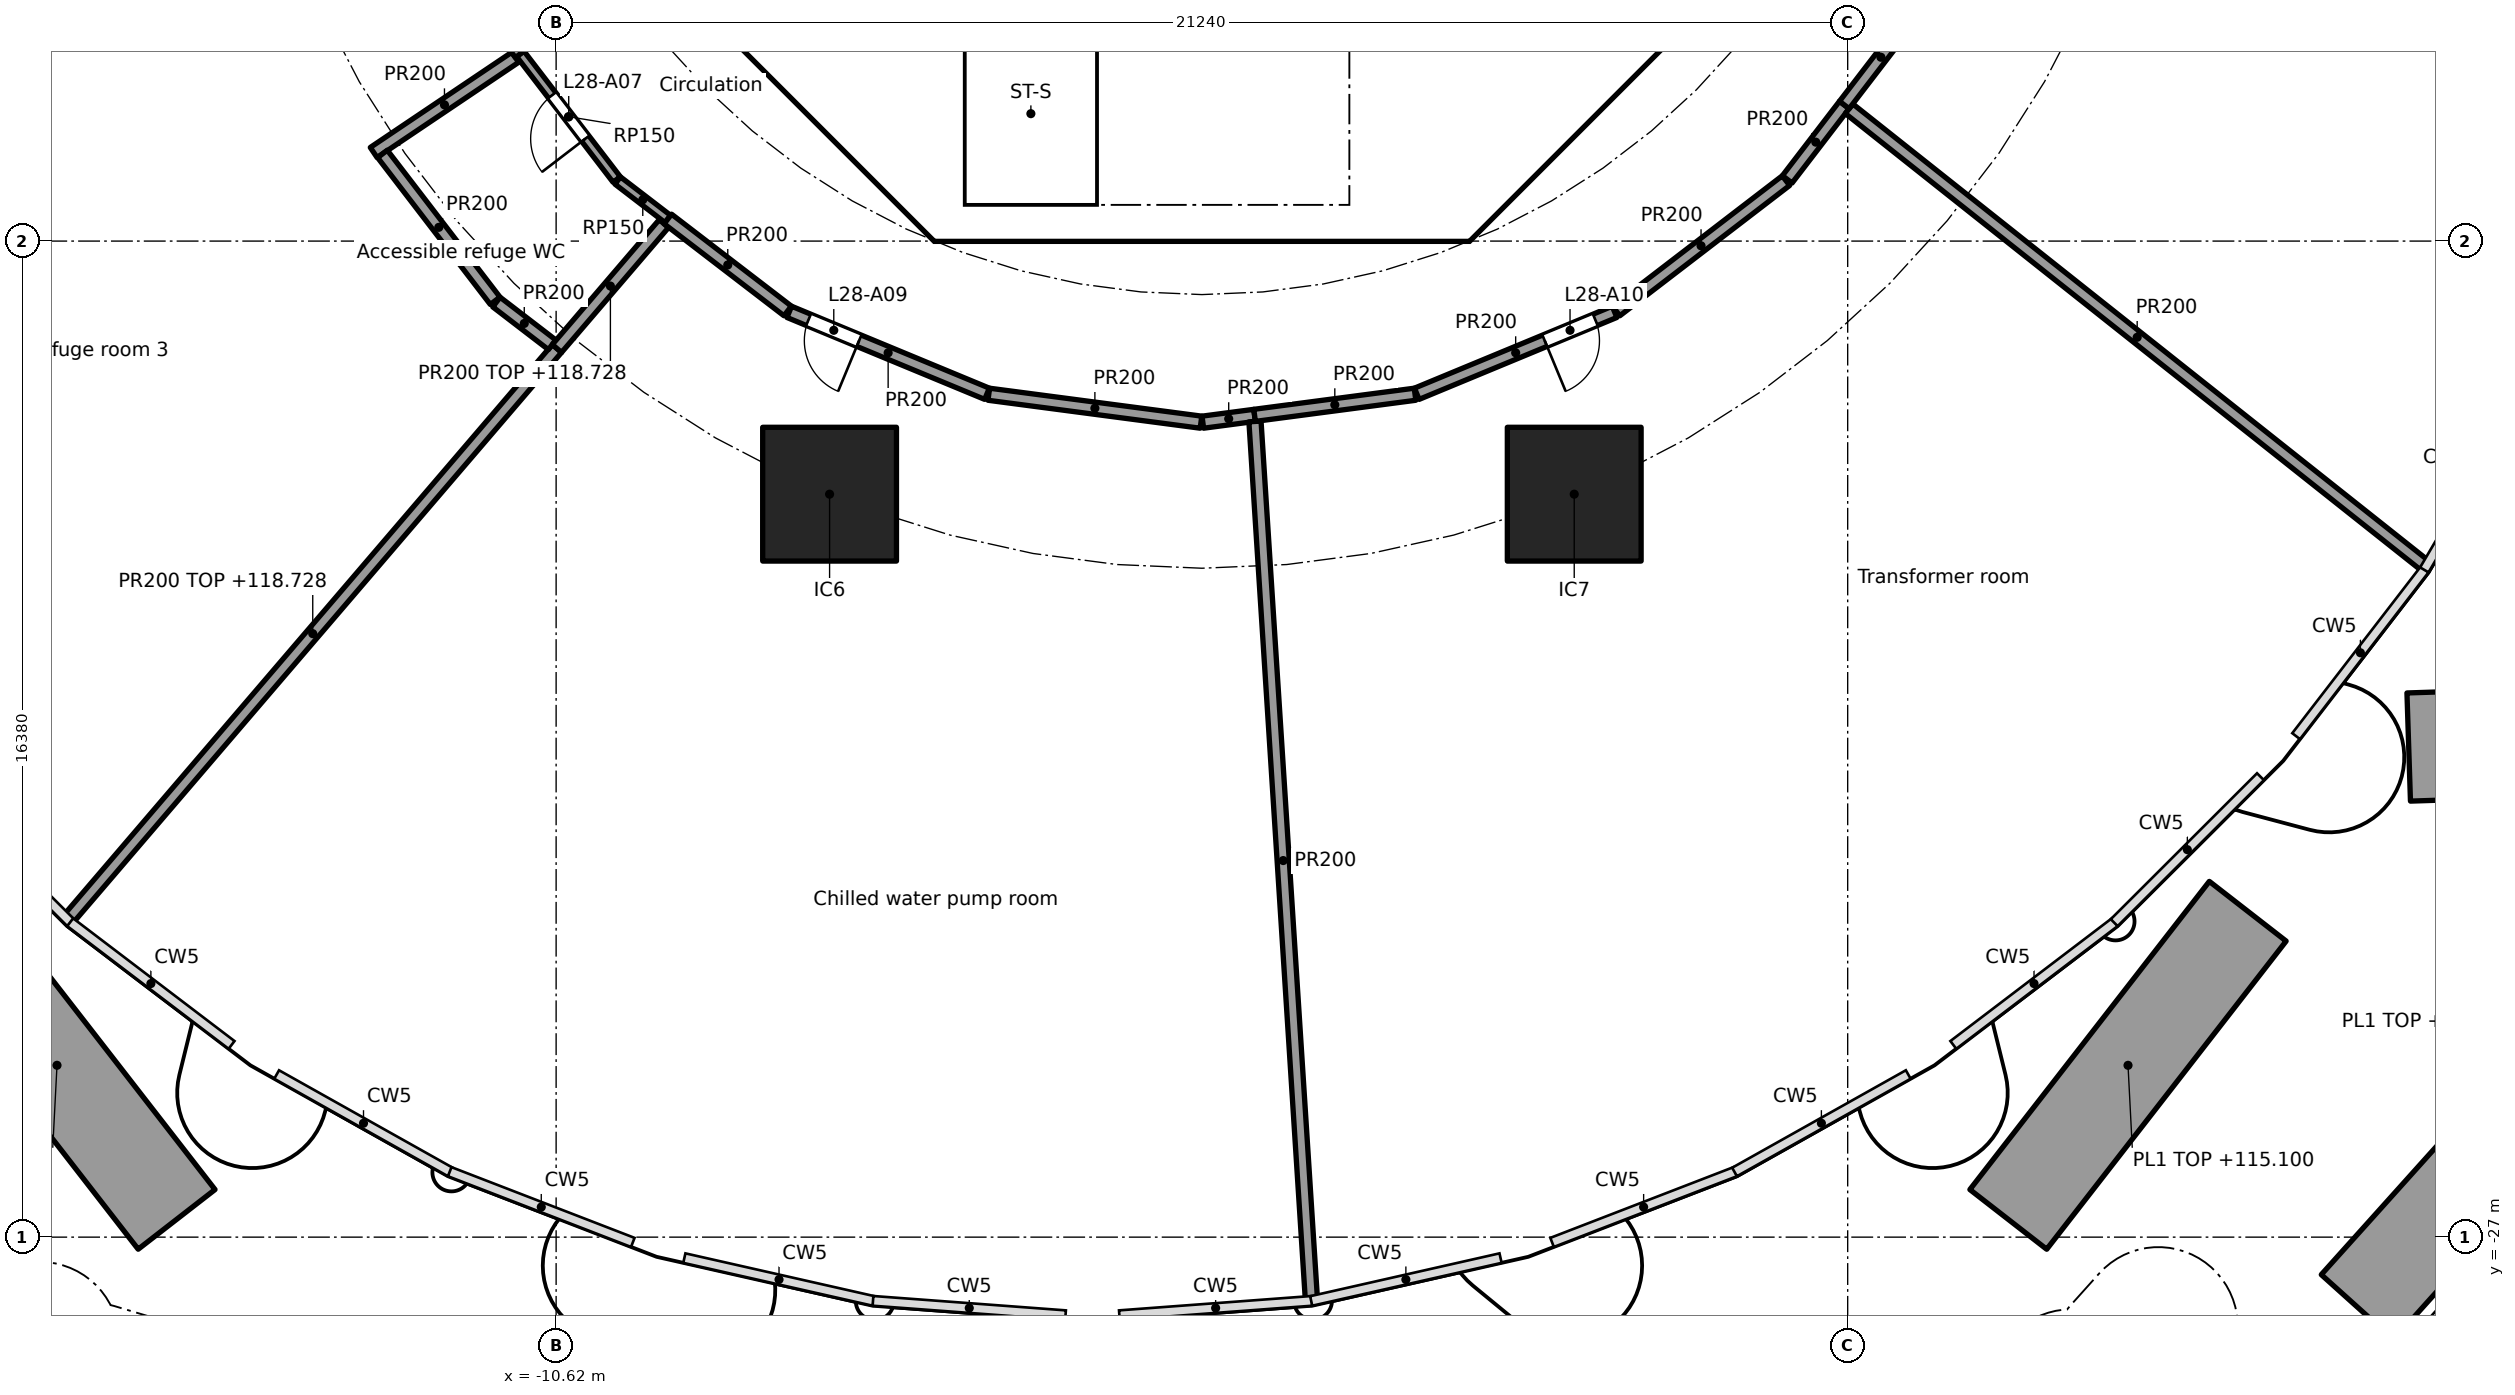
"""IFC4 building model, lengths in metres.
Left out: names, types, materials, properties, quantities, classifications, styles, units other than length and angle.
Written with IfcOpenShell. Run it as: python <this file> out.ifc"""

import sys

from ifc_helpers import new_model, si_unit, direction, frame, frame_2d, origin, origin_2d, place, context, subcontext, project, spatial, polyline, rectangle, outline, extrude, element, fill, save


model = new_model("IFC4")
c1 = context("Model", 3, precision=1e-05, world=origin(), true_north=direction((0.0, 1.0)))
c2 = subcontext(c1, "Body", "Model", "MODEL_VIEW")
j1 = project(units=[si_unit("LENGTHUNIT", "METRE"), si_unit("PLANEANGLEUNIT", "RADIAN")], contexts=[c1])
p1 = place(None, origin())
s1 = spatial("IfcSite", under=j1, at=p1, CompositionType="ELEMENT")
p2 = place(p1, origin())
s2 = spatial("IfcBuilding", under=s1, at=p2, CompositionType="ELEMENT")
p3 = place(p2, frame((0.0, 0.0, 114.0)))
s3 = spatial("IfcBuildingStorey", under=s2, at=p3, CompositionType="ELEMENT", Elevation=114.0)
for number, where, z_axis, x_axis in (
    (1, (-6.123, -14.782, 0.0), (0.0, 0.0, 1.0), (1.0, 0.0, 0.0)),
    (2, (6.123, -14.782, 0.0), (0.0, 0.0, 1.0), (1.0, 0.0, 0.0)),
):
    element("IfcColumn", number, at=place(p3, frame(where, z_axis=z_axis, x_axis=x_axis)), inside=s3, PredefinedType="COLUMN", context=c2, shape_type="SweptSolid", body=[
        extrude(rectangle(XDim=2.2, YDim=2.2, at=origin_2d()), origin(), (0.0, 0.0, 1.0), 5.6),
    ])
p4 = place(p3, frame((-20.795, -21.64, 0.0), z_axis=(0.0, 0.0, 1.0), x_axis=(0.61315518922, -0.789962476281, 0.0)))
e3 = element("IfcWall", 3, at=p4, inside=s3, PredefinedType="SOLIDWALL", context=c2, shape_type="SweptSolid", body=[
    extrude(rectangle(XDim=6.415, YDim=1.6, at=frame_2d((3.208, 0.0))), origin(), (0.0, 0.0, 1.0), 1.1),
])
p5 = place(p3, frame((13.261, -26.708, 0.0), z_axis=(0.0, 0.0, 1.0), x_axis=(0.61355867143, 0.789649135194, 0.0)))
e4 = element("IfcWall", 4, at=p5, inside=s3, PredefinedType="SOLIDWALL", context=c2, shape_type="SweptSolid", body=[
    extrude(rectangle(XDim=6.418, YDim=1.6, at=frame_2d((3.209, 0.0))), origin(), (0.0, 0.0, 1.0), 1.1),
])
p6 = place(p3, frame((20.675, -19.804, 0.0), z_axis=(0.0, 0.0, 1.0), x_axis=(-0.032515399122, 0.999471234614, 0.0)))
e5 = element("IfcWall", 5, at=p6, inside=s3, PredefinedType="SOLIDWALL", context=c2, shape_type="SweptSolid", body=[
    extrude(rectangle(XDim=1.78, YDim=1.6, at=frame_2d((0.89, 0.0))), origin(), (0.0, 0.0, 1.0), 1.1),
])
p7 = place(p3, frame((24.611, -21.911, 0.0), z_axis=(0.0, 0.0, 1.0), x_axis=(-0.66838736225, -0.743813373088, 0.0)))
e6 = element("IfcWall", 6, at=p7, inside=s3, PredefinedType="SOLIDWALL", context=c2, shape_type="SweptSolid", body=[
    extrude(rectangle(XDim=8.39, YDim=1.6, at=frame_2d((4.195, 0.0))), origin(), (0.0, 0.0, 1.0), 1.1),
])
p8 = place(p3, frame((-9.988, -4.613, 0.0), z_axis=(0.0, 0.0, 1.0), x_axis=(0.707106781187, -0.707106781187, 0.0)))
e7 = element("IfcWall", 7, at=p8, inside=s3, PredefinedType="SHEAR", context=c2, shape_type="SweptSolid", body=[
    extrude(rectangle(XDim=7.602, YDim=0.6, at=frame_2d((3.801, 0.0))), origin(), (0.0, 0.0, 1.0), 5.34),
])
p9 = place(p8, frame((6.151, 0.0, 0.0)))
e8 = element("IfcOpeningElement", 8, at=p9, cuts=e7, PredefinedType="OPENING", context=c2, shape_type="SweptSolid", body=[
    extrude(rectangle(XDim=1.1, YDim=2.1, at=frame_2d((0.55, 1.05))), frame((0.0, 0.31, 0.0), z_axis=(0.0, -1.0, 0.0), x_axis=(1.0, 0.0, 0.0)), (0.0, 0.0, 1.0), 0.62),
])
p10 = place(p3, frame((4.613, -9.988, 0.0), z_axis=(0.0, 0.0, 1.0), x_axis=(0.707106781187, 0.707106781187, 0.0)))
e9 = element("IfcWall", 9, at=p10, inside=s3, PredefinedType="SHEAR", context=c2, shape_type="SweptSolid", body=[
    extrude(rectangle(XDim=7.602, YDim=0.6, at=frame_2d((3.801, 0.0))), origin(), (0.0, 0.0, 1.0), 5.34),
])
p11 = place(p10, frame((3.201, 0.0, 0.0)))
e10 = element("IfcOpeningElement", 10, at=p11, cuts=e9, PredefinedType="OPENING", context=c2, shape_type="SweptSolid", body=[
    extrude(rectangle(XDim=1.2, YDim=2.1, at=frame_2d((0.6, 1.05))), frame((0.0, 0.31, 0.0), z_axis=(0.0, -1.0, 0.0), x_axis=(1.0, 0.0, 0.0)), (0.0, 0.0, 1.0), 0.62),
])
p12 = place(p3, frame((4.0, -10.025, 0.0), z_axis=(0.0, 0.0, 1.0), x_axis=(0.0, 1.0, 0.0)))
e11 = element("IfcWall", 11, at=p12, inside=s3, PredefinedType="SOLIDWALL", context=c2, shape_type="SweptSolid", body=[
    extrude(rectangle(XDim=3.0, YDim=0.2, at=frame_2d((1.5, 0.0))), origin(), (0.0, 0.0, 1.0), 5.34),
])
p13 = place(p12, frame((0.975, 0.0, 0.0)))
e12 = element("IfcOpeningElement", 12, at=p13, cuts=e11, PredefinedType="OPENING", context=c2, shape_type="SweptSolid", body=[
    extrude(rectangle(XDim=1.1, YDim=2.1, at=frame_2d((0.55, 1.05))), frame((0.0, 0.11, 0.0), z_axis=(0.0, -1.0, 0.0), x_axis=(1.0, 0.0, 0.0)), (0.0, 0.0, 1.0), 0.22),
])
p14 = place(p3, frame((-5.8, -8.227, 0.0), z_axis=(0.0, 0.0, 1.0), x_axis=(0.0, 1.0, 0.0)))
e13 = element("IfcWall", 13, at=p14, inside=s3, PredefinedType="PARTITIONING", context=c2, shape_type="SweptSolid", body=[
    extrude(rectangle(XDim=3.927, YDim=0.15, at=frame_2d((1.963, 0.0))), origin(), (0.0, 0.0, 1.0), 5.34),
])
p15 = place(p14, frame((1.476, 0.0, 0.0)))
e14 = element("IfcOpeningElement", 14, at=p15, cuts=e13, PredefinedType="OPENING", context=c2, shape_type="SweptSolid", body=[
    extrude(rectangle(XDim=0.9, YDim=2.1, at=frame_2d((0.45, 1.05))), frame((0.0, 0.085, 0.0), z_axis=(0.0, -1.0, 0.0), x_axis=(1.0, 0.0, 0.0)), (0.0, 0.0, 1.0), 0.17),
])
p16 = place(p3, origin())
e15 = element("IfcWall", 15, at=p16, inside=s3, PredefinedType="SHEAR", context=c2, shape_type="SweptSolid", body=[
    extrude(outline(polyline([(-4.152, -10.025), (4.152, -10.025), (4.401, -9.776), (4.825, -10.2), (4.401, -10.625), (-4.401, -10.625), (-4.825, -10.2), (-4.401, -9.776), (-4.152, -10.025)])), origin(), (0.0, 0.0, 1.0), 5.34),
])
p17 = place(p3, origin())
e16 = element("IfcWall", 16, at=p17, inside=s3, PredefinedType="SOLIDWALL", context=c2, shape_type="SweptSolid", body=[
    extrude(outline(polyline([(-3.9, -10.025), (-4.1, -10.025), (-4.1, -7.025), (-3.9, -7.025), (-3.9, -10.025)])), origin(), (0.0, 0.0, 1.0), 5.34),
])
p18 = place(p3, frame((-9.624, -9.607, 0.0), z_axis=(0.0, 0.0, 1.0), x_axis=(-0.608709012517, 0.793393558129, 0.0)))
e17 = element("IfcWall", 17, at=p18, inside=s3, PredefinedType="PARTITIONING", context=c2, shape_type="SweptSolid", body=[
    extrude(rectangle(XDim=2.604, YDim=0.15, at=frame_2d((1.302, 0.0))), origin(), (0.0, 0.0, 1.0), 5.34),
])
p19 = place(p18, frame((0.846, 0.0, 0.0)))
e18 = element("IfcOpeningElement", 18, at=p19, cuts=e17, PredefinedType="OPENING", context=c2, shape_type="SweptSolid", body=[
    extrude(rectangle(XDim=0.9, YDim=2.1, at=frame_2d((0.45, 1.05))), frame((0.0, 0.085, 0.0), z_axis=(0.0, -1.0, 0.0), x_axis=(1.0, 0.0, 0.0)), (0.0, 0.0, 1.0), 0.17),
])
p20 = place(p3, frame((-8.783, -10.257, 0.0), z_axis=(0.0, 0.0, 1.0), x_axis=(-0.793296129213, 0.608835980684, 0.0)))
e19 = element("IfcWall", 19, at=p20, inside=s3, PredefinedType="PARTITIONING", context=c2, shape_type="SweptSolid", body=[
    extrude(rectangle(XDim=1.039, YDim=0.15, at=frame_2d((0.52, 0.0))), origin(), (0.0, 0.0, 1.0), 5.34),
])
p21 = place(p3, frame((-13.62, -9.163, 0.0), z_axis=(0.0, 0.0, 1.0), x_axis=(0.829713316312, 0.558189764089, 0.0)))
e20 = element("IfcWall", 20, at=p21, inside=s3, PredefinedType="PARTITIONING", context=c2, shape_type="SweptSolid", body=[
    extrude(rectangle(XDim=2.805, YDim=0.2, at=frame_2d((1.403, 0.0))), origin(), (0.0, 0.0, 1.0), 5.34),
])
p22 = place(p3, frame((-11.623, -11.602, 0.0), z_axis=(0.0, 0.0, 1.0), x_axis=(-0.608791787862, 0.793330044201, 0.0)))
e21 = element("IfcWall", 21, at=p22, inside=s3, PredefinedType="PARTITIONING", context=c2, shape_type="SweptSolid", body=[
    extrude(rectangle(XDim=3.044, YDim=0.2, at=frame_2d((1.522, 0.0))), origin(), (0.0, 0.0, 1.0), 5.34),
])
p23 = place(p3, frame((-11.209, -7.541, 0.0), z_axis=(0.0, 0.0, 1.0), x_axis=(-0.608721561765, 0.793383929912, 0.0)))
e22 = element("IfcWall", 22, at=p23, inside=s3, PredefinedType="PARTITIONING", context=c2, shape_type="SweptSolid", body=[
    extrude(rectangle(XDim=0.919, YDim=0.2, at=frame_2d((0.459, 0.0))), origin(), (0.0, 0.0, 1.0), 5.34),
])
p24 = place(p3, frame((-10.607, -12.386, 0.0), z_axis=(0.0, 0.0, 1.0), x_axis=(-0.650437966539, -0.75955937996, 0.0)))
e23 = element("IfcWall", 23, at=p24, inside=s3, PredefinedType="PARTITIONING", context=c2, shape_type="SweptSolid", body=[
    extrude(rectangle(XDim=12.348, YDim=0.2, at=frame_2d((6.174, 0.0))), origin(), (0.0, 0.0, 1.0), 4.728),
])
p25 = place(p3, frame((-10.686, -12.325, 0.0), z_axis=(0.0, 0.0, 1.0), x_axis=(-0.793299821517, 0.608831169687, 0.0)))
e24 = element("IfcWall", 24, at=p25, inside=s3, PredefinedType="PARTITIONING", context=c2, shape_type="SweptSolid", body=[
    extrude(rectangle(XDim=1.154, YDim=0.2, at=frame_2d((0.577, 0.0))), origin(), (0.0, 0.0, 1.0), 5.34),
])
p26 = place(p3, frame((-8.848, -10.333, 0.0), z_axis=(0.0, 0.0, 1.0), x_axis=(-0.650412043265, -0.759581578223, 0.0)))
e25 = element("IfcWall", 25, at=p26, inside=s3, PredefinedType="PARTITIONING", context=c2, shape_type="SweptSolid", body=[
    extrude(rectangle(XDim=2.704, YDim=0.2, at=frame_2d((1.352, 0.0))), origin(), (0.0, 0.0, 1.0), 4.728),
])
p27 = place(p3, frame((-6.812, -11.769, 0.0), z_axis=(0.0, 0.0, 1.0), x_axis=(-0.793430741124, 0.608660545, 0.0)))
e26 = element("IfcWall", 26, at=p27, inside=s3, PredefinedType="PARTITIONING", context=c2, shape_type="SweptSolid", body=[
    extrude(rectangle(XDim=2.484, YDim=0.2, at=frame_2d((1.242, 0.0))), origin(), (0.0, 0.0, 1.0), 5.34),
])
p28 = place(p3, frame((-3.534, -13.131, 0.0), z_axis=(0.0, 0.0, 1.0), x_axis=(-0.92386297064, 0.382723413813, 0.0)))
e27 = element("IfcWall", 27, at=p28, inside=s3, PredefinedType="PARTITIONING", context=c2, shape_type="SweptSolid", body=[
    extrude(rectangle(XDim=3.52, YDim=0.2, at=frame_2d((1.76, 0.0))), origin(), (0.0, 0.0, 1.0), 5.34),
])
p29 = place(p28, frame((2.278, 0.0, 0.0)))
e28 = element("IfcOpeningElement", 28, at=p29, cuts=e27, PredefinedType="OPENING", context=c2, shape_type="SweptSolid", body=[
    extrude(rectangle(XDim=0.9, YDim=2.1, at=frame_2d((0.45, 1.05))), frame((0.0, 0.11, 0.0), z_axis=(0.0, -1.0, 0.0), x_axis=(1.0, 0.0, 0.0)), (0.0, 0.0, 1.0), 0.22),
])
p30 = place(p3, frame((-0.015, -13.598, 0.0), z_axis=(0.0, 0.0, 1.0), x_axis=(-0.991452406768, 0.130468866457, 0.0)))
e29 = element("IfcWall", 29, at=p30, inside=s3, PredefinedType="PARTITIONING", context=c2, shape_type="SweptSolid", body=[
    extrude(rectangle(XDim=3.52, YDim=0.2, at=frame_2d((1.76, 0.0))), origin(), (0.0, 0.0, 1.0), 5.34),
])
p31 = place(p3, frame((0.866, -13.486, 0.0), z_axis=(0.0, 0.0, 1.0), x_axis=(-0.991447519912, -0.130505997029, 0.0)))
e30 = element("IfcWall", 30, at=p31, inside=s3, PredefinedType="PARTITIONING", context=c2, shape_type="SweptSolid", body=[
    extrude(rectangle(XDim=0.859, YDim=0.2, at=frame_2d((0.429, 0.0))), origin(), (0.0, 0.0, 1.0), 5.34),
])
p32 = place(p3, frame((0.873, -13.586, 0.0), z_axis=(0.0, 0.0, 1.0), x_axis=(0.064121608835, -0.997942092148, 0.0)))
e31 = element("IfcWall", 31, at=p32, inside=s3, PredefinedType="PARTITIONING", context=c2, shape_type="SweptSolid", body=[
    extrude(rectangle(XDim=14.472, YDim=0.2, at=frame_2d((7.236, 0.0))), origin(), (0.0, 0.0, 1.0), 5.34),
])
p33 = place(p3, frame((3.505, -13.139, 0.0), z_axis=(0.0, 0.0, 1.0), x_axis=(-0.99145398328, -0.130456885743, 0.0)))
e32 = element("IfcWall", 32, at=p33, inside=s3, PredefinedType="PARTITIONING", context=c2, shape_type="SweptSolid", body=[
    extrude(rectangle(XDim=2.661, YDim=0.2, at=frame_2d((1.331, 0.0))), origin(), (0.0, 0.0, 1.0), 5.34),
])
p34 = place(p3, frame((6.786, -11.784, 0.0), z_axis=(0.0, 0.0, 1.0), x_axis=(-0.92386297064, -0.382723413813, 0.0)))
e33 = element("IfcWall", 33, at=p34, inside=s3, PredefinedType="PARTITIONING", context=c2, shape_type="SweptSolid", body=[
    extrude(rectangle(XDim=3.52, YDim=0.2, at=frame_2d((1.76, 0.0))), origin(), (0.0, 0.0, 1.0), 5.34),
])
p35 = place(p34, frame((0.342, 0.0, 0.0)))
e34 = element("IfcOpeningElement", 34, at=p35, cuts=e33, PredefinedType="OPENING", context=c2, shape_type="SweptSolid", body=[
    extrude(rectangle(XDim=0.9, YDim=2.1, at=frame_2d((0.45, 1.05))), frame((0.0, 0.11, 0.0), z_axis=(0.0, -1.0, 0.0), x_axis=(1.0, 0.0, 0.0)), (0.0, 0.0, 1.0), 0.22),
])
p36 = place(p3, frame((9.605, -9.626, 0.0), z_axis=(0.0, 0.0, 1.0), x_axis=(-0.793402024283, -0.608697977542, 0.0)))
e35 = element("IfcWall", 35, at=p36, inside=s3, PredefinedType="PARTITIONING", context=c2, shape_type="SweptSolid", body=[
    extrude(rectangle(XDim=3.52, YDim=0.2, at=frame_2d((1.76, 0.0))), origin(), (0.0, 0.0, 1.0), 5.34),
])
p37 = place(p3, frame((10.565, -8.381, 0.0), z_axis=(0.0, 0.0, 1.0), x_axis=(-0.608753901718, -0.793359116128, 0.0)))
e36 = element("IfcWall", 36, at=p37, inside=s3, PredefinedType="PARTITIONING", context=c2, shape_type="SweptSolid", body=[
    extrude(rectangle(XDim=1.542, YDim=0.2, at=frame_2d((0.771, 0.0))), origin(), (0.0, 0.0, 1.0), 5.34),
])
p38 = place(p3, frame((10.643, -8.443, 0.0), z_axis=(0.0, 0.0, 1.0), x_axis=(0.783408548954, -0.621507075926, 0.0)))
e37 = element("IfcWall", 37, at=p38, inside=s3, PredefinedType="PARTITIONING", context=c2, shape_type="SweptSolid", body=[
    extrude(rectangle(XDim=12.095, YDim=0.2, at=frame_2d((6.048, 0.0))), origin(), (0.0, 0.0, 1.0), 5.34),
])
p39 = place(p3, frame((11.769, -6.812, 0.0), z_axis=(0.0, 0.0, 1.0), x_axis=(-0.608654375099, -0.793435474171, 0.0)))
e38 = element("IfcWall", 38, at=p39, inside=s3, PredefinedType="PARTITIONING", context=c2, shape_type="SweptSolid", body=[
    extrude(rectangle(XDim=1.978, YDim=0.2, at=frame_2d((0.989, 0.0))), origin(), (0.0, 0.0, 1.0), 5.34),
])
p40 = place(p13, origin())
e39 = element("IfcDoor", 39, at=p40, inside=s3, OperationType="SINGLE_SWING_RIGHT", PredefinedType="DOOR", context=c2, shape_type="SweptSolid", body=[
    extrude(rectangle(XDim=1.1, YDim=2.1, at=frame_2d((0.55, 1.05))), frame((0.0, 0.025, 0.0), z_axis=(0.0, -1.0, 0.0), x_axis=(1.0, 0.0, 0.0)), (0.0, 0.0, 1.0), 0.05),
])
fill(e12, e39)
p41 = place(p11, origin())
e40 = element("IfcDoor", 40, at=p41, inside=s3, OperationType="SINGLE_SWING_RIGHT", PredefinedType="DOOR", context=c2, shape_type="SweptSolid", body=[
    extrude(rectangle(XDim=1.2, YDim=2.1, at=frame_2d((0.6, 1.05))), frame((0.0, 0.025, 0.0), z_axis=(0.0, -1.0, 0.0), x_axis=(1.0, 0.0, 0.0)), (0.0, 0.0, 1.0), 0.05),
])
fill(e10, e40)
p42 = place(p9, origin())
e41 = element("IfcDoor", 41, at=p42, inside=s3, OperationType="SINGLE_SWING_RIGHT", PredefinedType="DOOR", context=c2, shape_type="SweptSolid", body=[
    extrude(rectangle(XDim=1.1, YDim=2.1, at=frame_2d((0.55, 1.05))), frame((0.0, 0.025, 0.0), z_axis=(0.0, -1.0, 0.0), x_axis=(1.0, 0.0, 0.0)), (0.0, 0.0, 1.0), 0.05),
])
fill(e8, e41)
p43 = place(p19, origin())
e42 = element("IfcDoor", 42, at=p43, inside=s3, OperationType="SINGLE_SWING_LEFT", PredefinedType="DOOR", context=c2, shape_type="SweptSolid", body=[
    extrude(rectangle(XDim=0.9, YDim=2.1, at=frame_2d((0.45, 1.05))), frame((0.0, 0.025, 0.0), z_axis=(0.0, -1.0, 0.0), x_axis=(1.0, 0.0, 0.0)), (0.0, 0.0, 1.0), 0.05),
])
fill(e18, e42)
p44 = place(p29, origin())
e43 = element("IfcDoor", 43, at=p44, inside=s3, OperationType="SINGLE_SWING_LEFT", PredefinedType="DOOR", context=c2, shape_type="SweptSolid", body=[
    extrude(rectangle(XDim=0.9, YDim=2.1, at=frame_2d((0.45, 1.05))), frame((0.0, 0.025, 0.0), z_axis=(0.0, -1.0, 0.0), x_axis=(1.0, 0.0, 0.0)), (0.0, 0.0, 1.0), 0.05),
])
fill(e28, e43)
p45 = place(p35, origin())
e44 = element("IfcDoor", 44, at=p45, inside=s3, OperationType="SINGLE_SWING_RIGHT", PredefinedType="DOOR", context=c2, shape_type="SweptSolid", body=[
    extrude(rectangle(XDim=0.9, YDim=2.1, at=frame_2d((0.45, 1.05))), frame((0.0, 0.025, 0.0), z_axis=(0.0, -1.0, 0.0), x_axis=(1.0, 0.0, 0.0)), (0.0, 0.0, 1.0), 0.05),
])
fill(e34, e44)
save(model, sys.argv[1])
